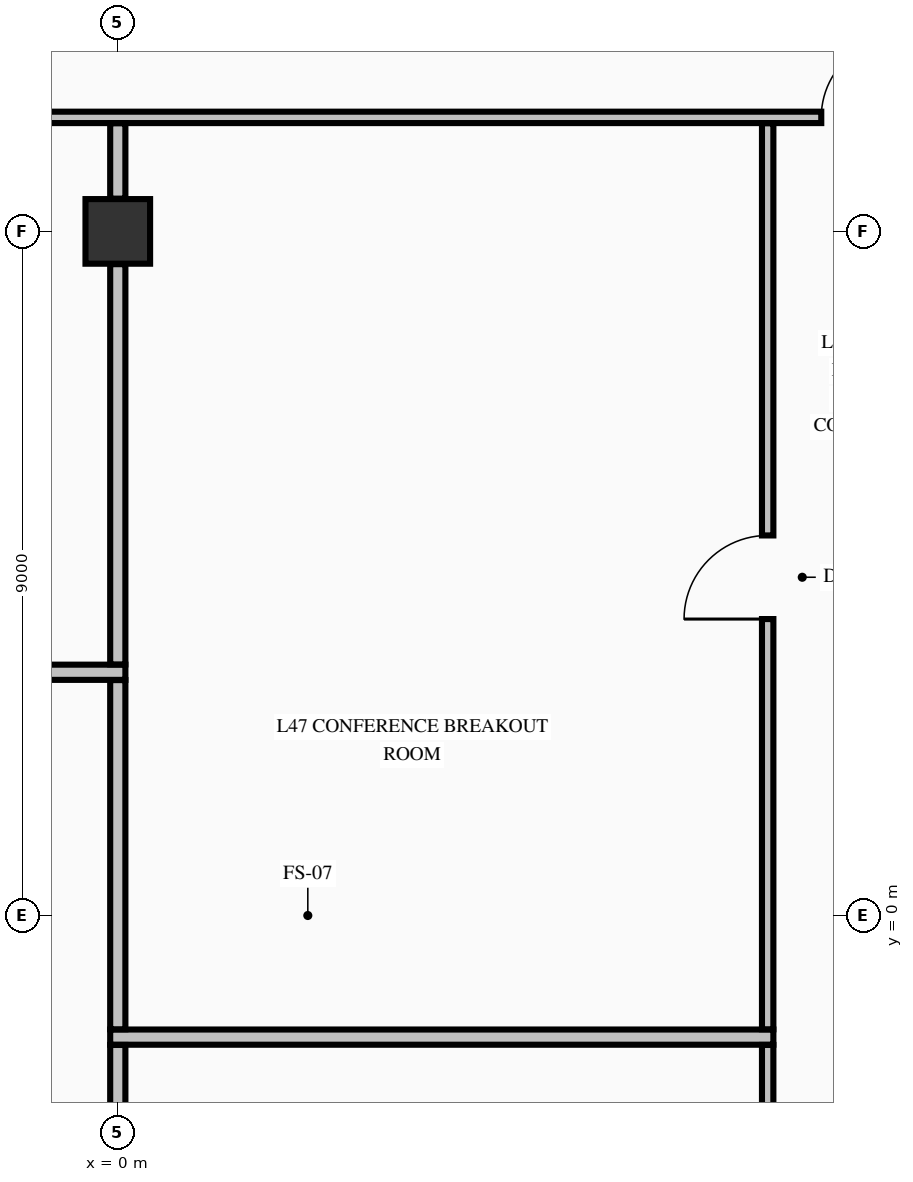
"""IFC4 building model, lengths in metres.
Left out: names, types, materials, properties, quantities, classifications, styles, units other than length and angle.
Written with IfcOpenShell. Run it as: python <this file> out.ifc"""

import sys

from ifc_helpers import new_model, si_unit, direction, frame, frame_2d, origin, origin_2d, place, context, subcontext, project, spatial, rectangle, extrude, element, fill, save


model = new_model("IFC4")
c1 = context("Model", 3, precision=1e-05, world=origin(), true_north=direction((0.0, 1.0)))
c2 = subcontext(c1, "Body", "Model", "MODEL_VIEW")
j1 = project(units=[si_unit("LENGTHUNIT", "METRE"), si_unit("PLANEANGLEUNIT", "RADIAN")], contexts=[c1])
p1 = place(None, origin())
s1 = spatial("IfcSite", under=j1, at=p1, CompositionType="ELEMENT")
p2 = place(p1, origin())
s2 = spatial("IfcBuilding", under=s1, at=p2, CompositionType="ELEMENT")
p3 = place(p2, frame((0.0, 0.0, 183.06)))
s3 = spatial("IfcBuildingStorey", under=s2, at=p3, CompositionType="ELEMENT", Elevation=183.06)
p4 = place(p3, frame((0.0, 9.0, -0.25), z_axis=(0.0, 0.0, 1.0), x_axis=(1.0, 0.0, 0.0)))
e1 = element("IfcColumn", 1, at=p4, inside=s3, PredefinedType="COLUMN", context=c2, shape_type="SweptSolid", body=[
    extrude(rectangle(XDim=0.85, YDim=0.85, at=origin_2d()), origin(), (0.0, 0.0, 1.0), 3.225),
])
for number, where, z_axis, x_axis in (
    (2, (-0.1, -1.6, 0.0), (0.0, 0.0, 1.0), (1.0, 0.0, 0.0)),
    (3, (-8.625, 3.2, 0.0), (0.0, 0.0, 1.0), (1.0, 0.0, 0.0)),
):
    element("IfcWall", number, at=place(p3, frame(where, z_axis=z_axis, x_axis=x_axis)), inside=s3, PredefinedType="PARTITIONING", context=c2, shape_type="SweptSolid", body=[
        extrude(rectangle(XDim=8.725, YDim=0.2, at=frame_2d((4.363, 0.0))), origin(), (0.0, 0.0, 1.0), 2.975),
    ])
p5 = place(p3, frame((-10.569, 10.5, 0.0), z_axis=(0.0, 0.0, 1.0), x_axis=(1.0, 0.0, 0.0)))
e4 = element("IfcWall", 4, at=p5, inside=s3, PredefinedType="PARTITIONING", context=c2, shape_type="SweptSolid", body=[
    extrude(rectangle(XDim=21.138, YDim=0.15, at=frame_2d((10.569, 0.0))), origin(), (0.0, 0.0, 1.0), 2.975),
])
p6 = place(p5, frame((0.264, 0.0, 0.0)))
e5 = element("IfcOpeningElement", 5, at=p6, cuts=e4, PredefinedType="OPENING", context=c2, shape_type="SweptSolid", body=[
    extrude(rectangle(XDim=1.05, YDim=2.15, at=frame_2d((0.525, 1.075))), frame((0.0, 0.085, 0.0), z_axis=(0.0, -1.0, 0.0), x_axis=(1.0, 0.0, 0.0)), (0.0, 0.0, 1.0), 0.17),
])
p7 = place(p5, frame((19.824, 0.0, 0.0)))
e6 = element("IfcOpeningElement", 6, at=p7, cuts=e4, PredefinedType="OPENING", context=c2, shape_type="SweptSolid", body=[
    extrude(rectangle(XDim=1.05, YDim=2.15, at=frame_2d((0.525, 1.075))), frame((0.0, 0.085, 0.0), z_axis=(0.0, -1.0, 0.0), x_axis=(1.0, 0.0, 0.0)), (0.0, 0.0, 1.0), 0.17),
])
p8 = place(p3, frame((0.0, -5.097, 0.0), z_axis=(0.0, 0.0, 1.0), x_axis=(0.0, 1.0, 0.0)))
e7 = element("IfcWall", 7, at=p8, inside=s3, PredefinedType="PARTITIONING", context=c2, shape_type="SweptSolid", body=[
    extrude(rectangle(XDim=3.394, YDim=0.2, at=frame_2d((1.697, 0.0))), origin(), (0.0, 0.0, 1.0), 2.167),
])
p9 = place(p3, frame((0.0, -1.497, 0.0), z_axis=(0.0, 0.0, 1.0), x_axis=(0.0, 1.0, 0.0)))
e8 = element("IfcWall", 8, at=p9, inside=s3, PredefinedType="PARTITIONING", context=c2, shape_type="SweptSolid", body=[
    extrude(rectangle(XDim=4.594, YDim=0.2, at=frame_2d((2.297, 0.0))), origin(), (0.0, 0.0, 1.0), 2.167),
])
p10 = place(p3, frame((0.0, 3.303, 0.0), z_axis=(0.0, 0.0, 1.0), x_axis=(0.0, 1.0, 0.0)))
e9 = element("IfcWall", 9, at=p10, inside=s3, PredefinedType="PARTITIONING", context=c2, shape_type="SweptSolid", body=[
    extrude(rectangle(XDim=5.266, YDim=0.2, at=frame_2d((2.633, 0.0))), origin(), (0.0, 0.0, 1.0), 2.167),
])
p11 = place(p3, frame((0.0, 9.431, 0.0), z_axis=(0.0, 0.0, 1.0), x_axis=(0.0, 1.0, 0.0)))
e10 = element("IfcWall", 10, at=p11, inside=s3, PredefinedType="PARTITIONING", context=c2, shape_type="SweptSolid", body=[
    extrude(rectangle(XDim=0.991, YDim=0.2, at=frame_2d((0.496, 0.0))), origin(), (0.0, 0.0, 1.0), 2.167),
])
p12 = place(p3, frame((8.55, -5.097, 0.0), z_axis=(0.0, 0.0, 1.0), x_axis=(0.0, 1.0, 0.0)))
e11 = element("IfcWall", 11, at=p12, inside=s3, PredefinedType="PARTITIONING", context=c2, shape_type="SweptSolid", body=[
    extrude(rectangle(XDim=3.394, YDim=0.15, at=frame_2d((1.697, 0.0))), origin(), (0.0, 0.0, 1.0), 2.975),
])
p13 = place(p12, frame((1.222, 0.0, 0.0)))
e12 = element("IfcOpeningElement", 12, at=p13, cuts=e11, PredefinedType="OPENING", context=c2, shape_type="SweptSolid", body=[
    extrude(rectangle(XDim=0.95, YDim=2.15, at=frame_2d((0.475, 1.075))), frame((0.0, 0.085, 0.0), z_axis=(0.0, -1.0, 0.0), x_axis=(1.0, 0.0, 0.0)), (0.0, 0.0, 1.0), 0.17),
])
p14 = place(p3, frame((8.55, -1.497, 0.0), z_axis=(0.0, 0.0, 1.0), x_axis=(0.0, 1.0, 0.0)))
e13 = element("IfcWall", 13, at=p14, inside=s3, PredefinedType="PARTITIONING", context=c2, shape_type="SweptSolid", body=[
    extrude(rectangle(XDim=11.919, YDim=0.15, at=frame_2d((5.959, 0.0))), origin(), (0.0, 0.0, 1.0), 2.975),
])
p15 = place(p14, frame((5.397, 0.0, 0.0)))
e14 = element("IfcOpeningElement", 14, at=p15, cuts=e13, PredefinedType="OPENING", context=c2, shape_type="SweptSolid", body=[
    extrude(rectangle(XDim=1.1, YDim=2.15, at=frame_2d((0.55, 1.075))), frame((0.0, 0.085, 0.0), z_axis=(0.0, -1.0, 0.0), x_axis=(1.0, 0.0, 0.0)), (0.0, 0.0, 1.0), 0.17),
])
p16 = place(p7, origin())
e15 = element("IfcDoor", 15, at=p16, inside=s3, OperationType="SINGLE_SWING_RIGHT", PredefinedType="DOOR", context=c2, shape_type="SweptSolid", body=[
    extrude(rectangle(XDim=1.05, YDim=2.15, at=frame_2d((0.525, 1.075))), frame((0.0, 0.025, 0.0), z_axis=(0.0, -1.0, 0.0), x_axis=(1.0, 0.0, 0.0)), (0.0, 0.0, 1.0), 0.05),
])
fill(e6, e15)
p17 = place(p15, origin())
e16 = element("IfcDoor", 16, at=p17, inside=s3, OperationType="SINGLE_SWING_LEFT", PredefinedType="DOOR", context=c2, shape_type="SweptSolid", body=[
    extrude(rectangle(XDim=1.1, YDim=2.15, at=frame_2d((0.55, 1.075))), frame((0.0, 0.025, 0.0), z_axis=(0.0, -1.0, 0.0), x_axis=(1.0, 0.0, 0.0)), (0.0, 0.0, 1.0), 0.05),
])
fill(e14, e16)
save(model, sys.argv[1])
